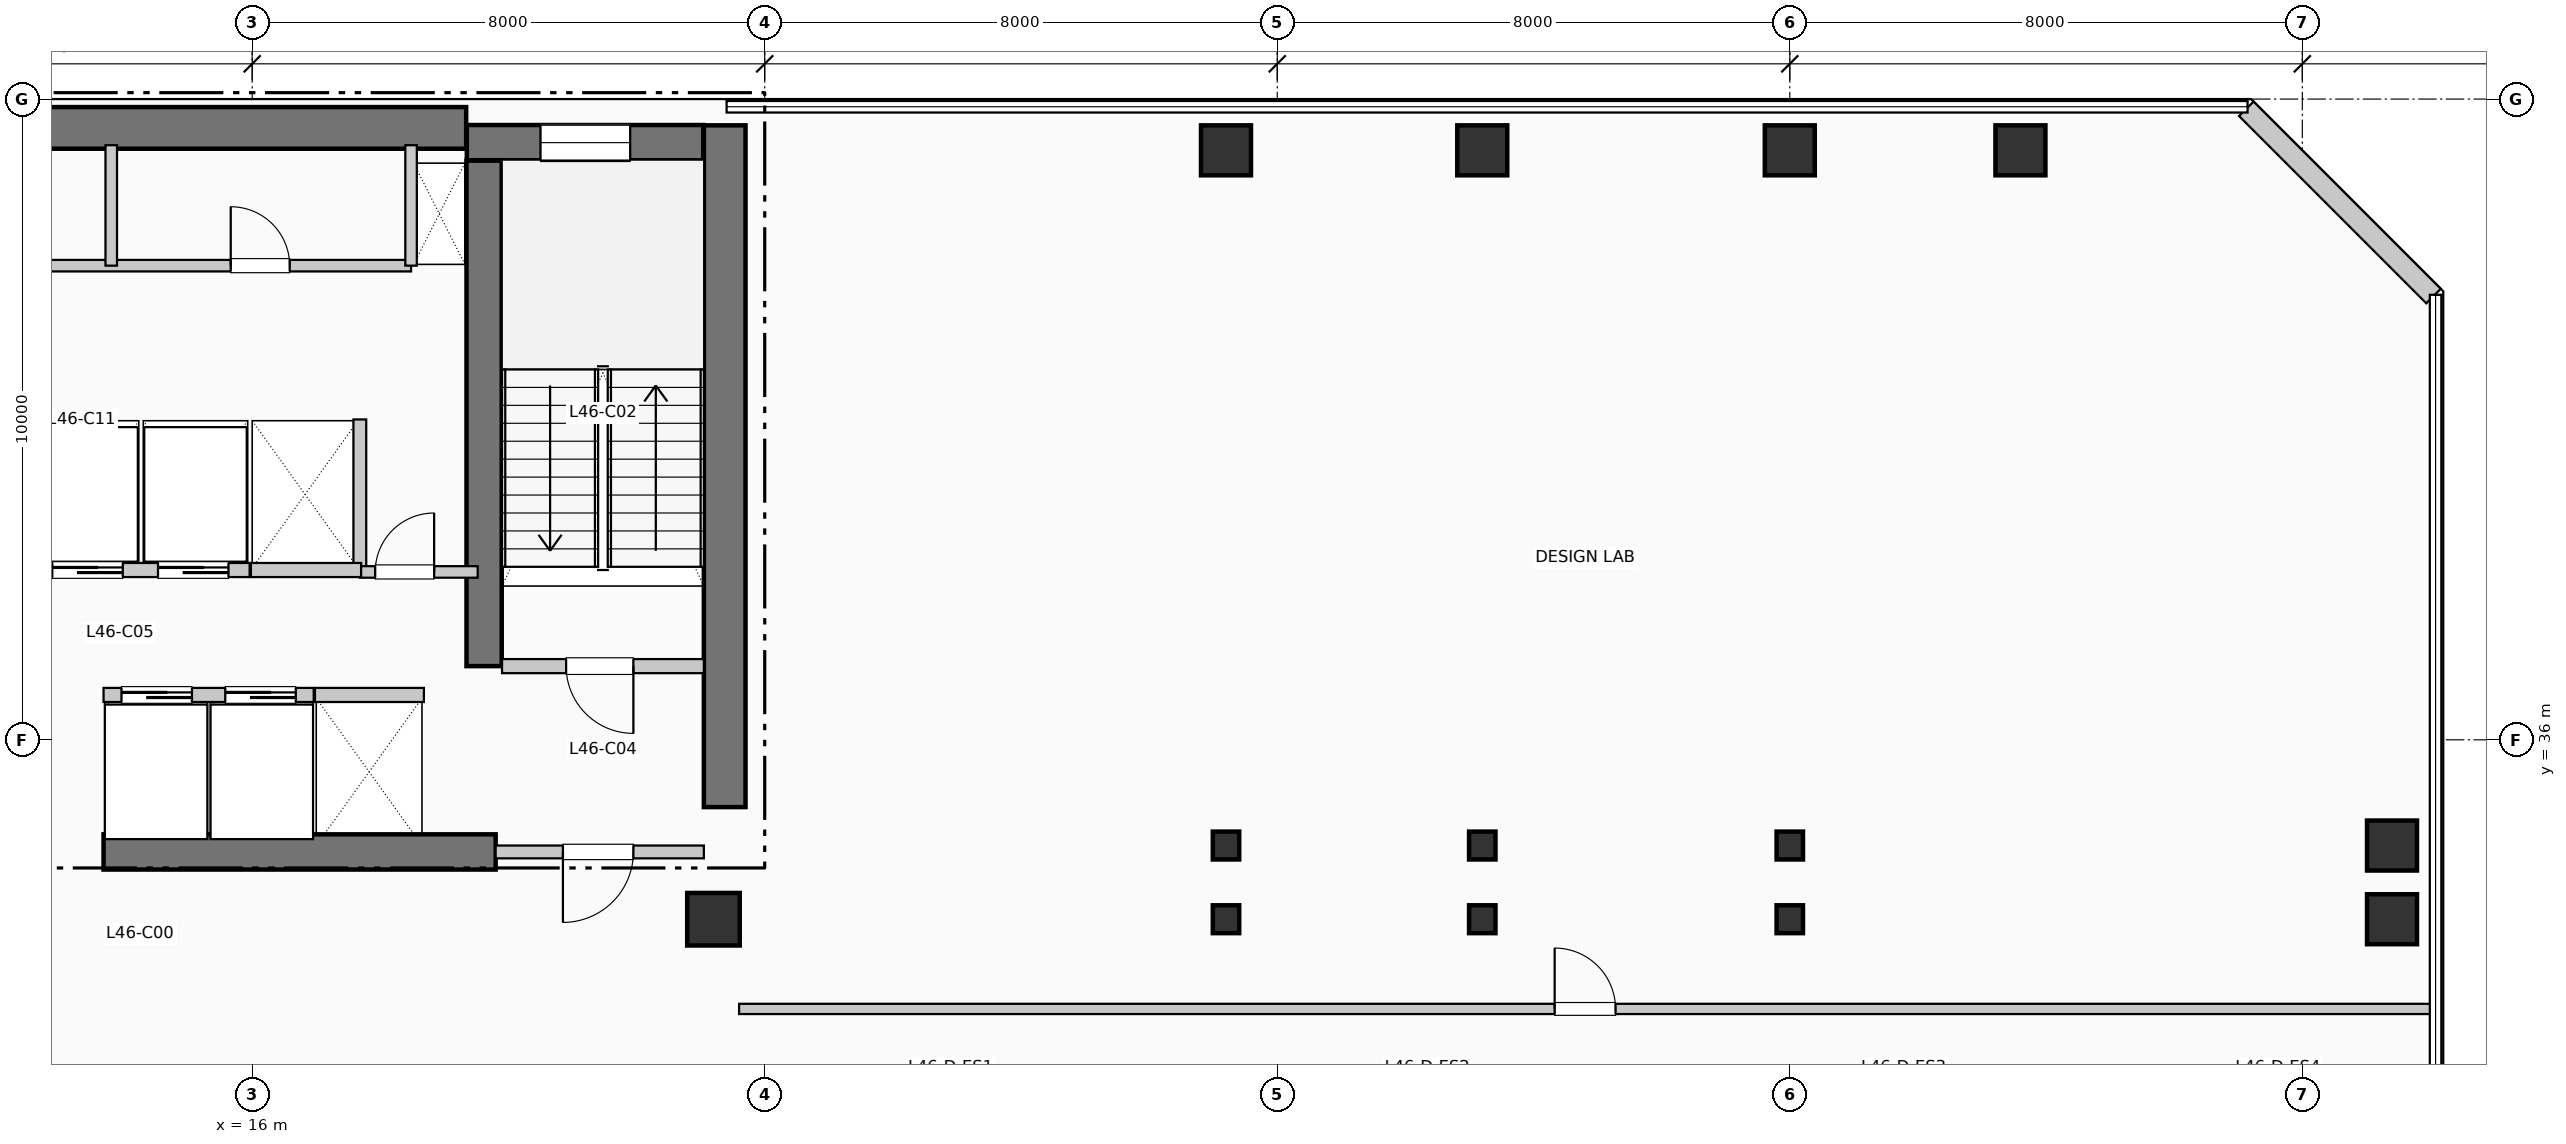
"""IFC4 building model, lengths in metres.
Left out: names, types, materials, properties, quantities, classifications, styles, units other than length and angle.
Written with IfcOpenShell. Run it as: python <this file> out.ifc"""

import sys

from ifc_helpers import new_model, si_unit, direction, frame, frame_2d, origin, origin_2d, place, context, subcontext, project, spatial, rectangle, i_section, extrude, element, fill, save


model = new_model("IFC4")
c1 = context("Model", 3, precision=1e-05, world=origin(), true_north=direction((0.0, 1.0)))
c2 = subcontext(c1, "Body", "Model", "MODEL_VIEW")
j1 = project(units=[si_unit("LENGTHUNIT", "METRE"), si_unit("PLANEANGLEUNIT", "RADIAN")], contexts=[c1])
p1 = place(None, origin())
s1 = spatial("IfcSite", under=j1, at=p1, CompositionType="ELEMENT")
p2 = place(p1, origin())
s2 = spatial("IfcBuilding", under=s1, at=p2, CompositionType="ELEMENT")
p3 = place(p2, frame((0.0, 0.0, 191.4)))
s3 = spatial("IfcBuildingStorey", under=s2, at=p3, CompositionType="ELEMENT", Elevation=191.4)
p4 = place(p3, frame((5.36, 45.55, 0.0), z_axis=(0.0, 0.0, 1.0), x_axis=(1.0, 0.0, 0.0)))
e1 = element("IfcWall", 1, at=p4, inside=s3, PredefinedType="SHEAR", context=c2, shape_type="SweptSolid", body=[
    extrude(rectangle(XDim=13.98, YDim=0.65, at=frame_2d((6.99, 0.0))), origin(), (0.0, 0.0, 1.0), 3.96),
])
p5 = place(p3, frame((23.375, 34.95, 0.0), z_axis=(0.0, 0.0, 1.0), x_axis=(0.0, 1.0, 0.0)))
e2 = element("IfcWall", 2, at=p5, inside=s3, PredefinedType="SHEAR", context=c2, shape_type="SweptSolid", body=[
    extrude(rectangle(XDim=10.64, YDim=0.65, at=frame_2d((5.32, 0.0))), origin(), (0.0, 0.0, 1.0), 3.96),
])
p6 = place(p3, frame((13.68, 34.25, 0.0), z_axis=(0.0, 0.0, 1.0), x_axis=(1.0, 0.0, 0.0)))
e3 = element("IfcWall", 3, at=p6, inside=s3, PredefinedType="SHEAR", context=c2, shape_type="SweptSolid", body=[
    extrude(rectangle(XDim=6.12, YDim=0.55, at=frame_2d((3.06, 0.0))), origin(), (0.0, 0.0, 1.0), 3.96),
])
p7 = place(p3, frame((19.62, 37.15, 0.0), z_axis=(0.0, 0.0, 1.0), x_axis=(0.0, 1.0, 0.0)))
e4 = element("IfcWall", 4, at=p7, inside=s3, PredefinedType="SHEAR", context=c2, shape_type="SweptSolid", body=[
    extrude(rectangle(XDim=7.89, YDim=0.55, at=frame_2d((3.945, 0.0))), origin(), (0.0, 0.0, 1.0), 3.96),
])
p8 = place(p3, frame((19.35, 45.32, 0.0), z_axis=(0.0, 0.0, 1.0), x_axis=(1.0, 0.0, 0.0)))
e5 = element("IfcWall", 5, at=p8, inside=s3, PredefinedType="SHEAR", context=c2, shape_type="SweptSolid", body=[
    extrude(rectangle(XDim=3.69, YDim=0.55, at=frame_2d((1.845, 0.0))), origin(), (0.0, 0.0, 1.0), 3.96),
])
p9 = place(p8, frame((1.15, 0.0, 1.05)))
e6 = element("IfcOpeningElement", 6, at=p9, cuts=e5, PredefinedType="OPENING", context=c2, shape_type="SweptSolid", body=[
    extrude(rectangle(XDim=1.4, YDim=1.8, at=frame_2d((0.7, 0.9))), frame((0.0, 0.285, 0.0), z_axis=(0.0, -1.0, 0.0), x_axis=(1.0, 0.0, 0.0)), (0.0, 0.0, 1.0), 0.57),
])
p10 = place(p3, frame((23.2, 33.2, 0.0), z_axis=(0.0, 0.0, 1.0), x_axis=(1.0, 0.0, 0.0)))
e7 = element("IfcColumn", 7, at=p10, inside=s3, PredefinedType="COLUMN", context=c2, shape_type="SweptSolid", body=[
    extrude(rectangle(XDim=0.82, YDim=0.82, at=origin_2d()), origin(), (0.0, 0.0, 1.0), 3.96),
])
for number, where, z_axis, x_axis in (
    (8, (31.2, 33.2, 0.0), (0.0, 0.0, 1.0), (1.0, 0.0, 0.0)),
    (9, (31.2, 34.35, 0.0), (0.0, 0.0, 1.0), (1.0, 0.0, 0.0)),
):
    element("IfcColumn", number, at=place(p3, frame(where, z_axis=z_axis, x_axis=x_axis)), inside=s3, PredefinedType="COLUMN", context=c2, shape_type="SweptSolid", body=[
        extrude(i_section(OverallWidth=0.412, OverallDepth=0.435, WebThickness=0.027, FlangeThickness=0.043, at=origin_2d()), origin(), (0.0, 0.0, 1.0), 3.96),
    ])
p11 = place(p3, frame((31.2, 45.2, 0.0), z_axis=(0.0, 0.0, 1.0), x_axis=(1.0, 0.0, 0.0)))
e10 = element("IfcColumn", 10, at=p11, inside=s3, PredefinedType="COLUMN", context=c2, shape_type="SweptSolid", body=[
    extrude(rectangle(XDim=0.78, YDim=0.78, at=origin_2d()), origin(), (0.0, 0.0, 1.0), 3.96),
])
for number, where, z_axis, x_axis in (
    (11, (35.2, 33.2, 0.0), (0.0, 0.0, 1.0), (1.0, 0.0, 0.0)),
    (12, (35.2, 34.35, 0.0), (0.0, 0.0, 1.0), (1.0, 0.0, 0.0)),
):
    element("IfcColumn", number, at=place(p3, frame(where, z_axis=z_axis, x_axis=x_axis)), inside=s3, PredefinedType="COLUMN", context=c2, shape_type="SweptSolid", body=[
        extrude(i_section(OverallWidth=0.412, OverallDepth=0.435, WebThickness=0.027, FlangeThickness=0.043, at=origin_2d()), origin(), (0.0, 0.0, 1.0), 3.96),
    ])
p12 = place(p3, frame((35.2, 45.2, 0.0), z_axis=(0.0, 0.0, 1.0), x_axis=(1.0, 0.0, 0.0)))
e13 = element("IfcColumn", 13, at=p12, inside=s3, PredefinedType="COLUMN", context=c2, shape_type="SweptSolid", body=[
    extrude(rectangle(XDim=0.78, YDim=0.78, at=origin_2d()), origin(), (0.0, 0.0, 1.0), 3.96),
])
for number, where, z_axis, x_axis in (
    (14, (40.0, 33.2, 0.0), (0.0, 0.0, 1.0), (1.0, 0.0, 0.0)),
    (15, (40.0, 34.35, 0.0), (0.0, 0.0, 1.0), (1.0, 0.0, 0.0)),
):
    element("IfcColumn", number, at=place(p3, frame(where, z_axis=z_axis, x_axis=x_axis)), inside=s3, PredefinedType="COLUMN", context=c2, shape_type="SweptSolid", body=[
        extrude(i_section(OverallWidth=0.412, OverallDepth=0.435, WebThickness=0.027, FlangeThickness=0.043, at=origin_2d()), origin(), (0.0, 0.0, 1.0), 3.96),
    ])
for number, where, z_axis, x_axis in (
    (16, (40.0, 45.2, 0.0), (0.0, 0.0, 1.0), (1.0, 0.0, 0.0)),
    (17, (43.6, 45.2, 0.0), (0.0, 0.0, 1.0), (1.0, 0.0, 0.0)),
    (18, (49.4, 33.2, 0.0), (0.0, 0.0, 1.0), (1.0, 0.0, 0.0)),
    (19, (49.4, 34.35, 0.0), (0.0, 0.0, 1.0), (1.0, 0.0, 0.0)),
):
    element("IfcColumn", number, at=place(p3, frame(where, z_axis=z_axis, x_axis=x_axis)), inside=s3, PredefinedType="COLUMN", context=c2, shape_type="SweptSolid", body=[
        extrude(rectangle(XDim=0.78, YDim=0.78, at=origin_2d()), origin(), (0.0, 0.0, 1.0), 3.96),
    ])
p13 = place(p3, frame((50.048, 42.926, 0.0), z_axis=(0.0, 0.0, 1.0), x_axis=(-0.707136318428, 0.707077242712, 0.0)))
e20 = element("IfcWall", 20, at=p13, inside=s3, PredefinedType="SOLIDWALL", context=c2, shape_type="SweptSolid", body=[
    extrude(rectangle(XDim=4.133, YDim=0.32, at=frame_2d((2.066, 0.0))), origin(), (0.0, 0.0, 1.0), 3.71),
])
p14 = place(p3, frame((19.9, 37.15, 0.0), z_axis=(0.0, 0.0, 1.0), x_axis=(1.0, 0.0, 0.0)))
e21 = element("IfcWall", 21, at=p14, inside=s3, PredefinedType="PARTITIONING", context=c2, shape_type="SweptSolid", body=[
    extrude(rectangle(XDim=3.15, YDim=0.22, at=frame_2d((1.575, 0.0))), origin(), (0.0, 0.0, 1.0), 3.71),
])
p15 = place(p14, frame((2.05, 0.0, 0.0), z_axis=(0.0, 0.0, 1.0), x_axis=(-1.0, 0.0, 0.0)))
e22 = element("IfcOpeningElement", 22, at=p15, cuts=e21, PredefinedType="OPENING", context=c2, shape_type="SweptSolid", body=[
    extrude(rectangle(XDim=1.05, YDim=2.15, at=frame_2d((0.525, 1.075))), frame((0.0, 0.12, 0.0), z_axis=(0.0, -1.0, 0.0), x_axis=(1.0, 0.0, 0.0)), (0.0, 0.0, 1.0), 0.24),
])
p16 = place(p3, frame((19.8, 34.25, 0.0), z_axis=(0.0, 0.0, 1.0), x_axis=(1.0, 0.0, 0.0)))
e23 = element("IfcWall", 23, at=p16, inside=s3, PredefinedType="PARTITIONING", context=c2, shape_type="SweptSolid", body=[
    extrude(rectangle(XDim=3.25, YDim=0.2, at=frame_2d((1.625, 0.0))), origin(), (0.0, 0.0, 1.0), 3.71),
])
p17 = place(p16, frame((2.15, 0.0, 0.0), z_axis=(0.0, 0.0, 1.0), x_axis=(-1.0, 0.0, 0.0)))
e24 = element("IfcOpeningElement", 24, at=p17, cuts=e23, PredefinedType="OPENING", context=c2, shape_type="SweptSolid", body=[
    extrude(rectangle(XDim=1.1, YDim=2.15, at=frame_2d((0.55, 1.075))), frame((0.0, 0.11, 0.0), z_axis=(0.0, -1.0, 0.0), x_axis=(1.0, 0.0, 0.0)), (0.0, 0.0, 1.0), 0.22),
])
p18 = place(p3, frame((17.68, 38.65, 0.0), z_axis=(0.0, 0.0, 1.0), x_axis=(0.0, 1.0, 0.0)))
e25 = element("IfcWall", 25, at=p18, inside=s3, PredefinedType="PARTITIONING", context=c2, shape_type="SweptSolid", body=[
    extrude(rectangle(XDim=2.35, YDim=0.2, at=frame_2d((1.175, 0.0))), origin(), (0.0, 0.0, 1.0), 3.71),
])
p19 = place(p3, frame((17.68, 38.62, 0.0), z_axis=(0.0, 0.0, 1.0), x_axis=(1.0, 0.0, 0.0)))
e26 = element("IfcWall", 26, at=p19, inside=s3, PredefinedType="PARTITIONING", context=c2, shape_type="SweptSolid", body=[
    extrude(rectangle(XDim=1.84, YDim=0.18, at=frame_2d((0.92, 0.0))), origin(), (0.0, 0.0, 1.0), 3.71),
])
p20 = place(p19, frame((0.24, 0.0, 0.0)))
e27 = element("IfcOpeningElement", 27, at=p20, cuts=e26, PredefinedType="OPENING", context=c2, shape_type="SweptSolid", body=[
    extrude(rectangle(XDim=0.92, YDim=2.1, at=frame_2d((0.46, 1.05))), frame((0.0, 0.1, 0.0), z_axis=(0.0, -1.0, 0.0), x_axis=(1.0, 0.0, 0.0)), (0.0, 0.0, 1.0), 0.2),
])
p21 = place(p3, frame((13.68, 36.7, 0.0), z_axis=(0.0, 0.0, 1.0), x_axis=(1.0, 0.0, 0.0)))
e28 = element("IfcWall", 28, at=p21, inside=s3, PredefinedType="PARTITIONING", context=c2, shape_type="SweptSolid", body=[
    extrude(rectangle(XDim=3.28, YDim=0.22, at=frame_2d((1.64, 0.0))), origin(), (0.0, 0.0, 1.0), 3.71),
])
p22 = place(p21, frame((0.28, 0.0, 0.0)))
e29 = element("IfcOpeningElement", 29, at=p22, cuts=e28, PredefinedType="OPENING", context=c2, shape_type="SweptSolid", body=[
    extrude(rectangle(XDim=1.1, YDim=2.2, at=frame_2d((0.55, 1.1))), frame((0.0, 0.12, 0.0), z_axis=(0.0, -1.0, 0.0), x_axis=(1.0, 0.0, 0.0)), (0.0, 0.0, 1.0), 0.24),
])
p23 = place(p21, frame((1.9, 0.0, 0.0)))
e30 = element("IfcOpeningElement", 30, at=p23, cuts=e28, PredefinedType="OPENING", context=c2, shape_type="SweptSolid", body=[
    extrude(rectangle(XDim=1.1, YDim=2.2, at=frame_2d((0.55, 1.1))), frame((0.0, 0.12, 0.0), z_axis=(0.0, -1.0, 0.0), x_axis=(1.0, 0.0, 0.0)), (0.0, 0.0, 1.0), 0.24),
])
p24 = place(p3, frame((12.58, 38.65, 0.0), z_axis=(0.0, 0.0, 1.0), x_axis=(1.0, 0.0, 0.0)))
e31 = element("IfcWall", 31, at=p24, inside=s3, PredefinedType="PARTITIONING", context=c2, shape_type="SweptSolid", body=[
    extrude(rectangle(XDim=3.38, YDim=0.22, at=frame_2d((1.69, 0.0))), origin(), (0.0, 0.0, 1.0), 3.71),
])
p25 = place(p24, frame((0.3, 0.0, 0.0)))
e32 = element("IfcOpeningElement", 32, at=p25, cuts=e31, PredefinedType="OPENING", context=c2, shape_type="SweptSolid", body=[
    extrude(rectangle(XDim=1.1, YDim=2.2, at=frame_2d((0.55, 1.1))), frame((0.0, 0.12, 0.0), z_axis=(0.0, -1.0, 0.0), x_axis=(1.0, 0.0, 0.0)), (0.0, 0.0, 1.0), 0.24),
])
p26 = place(p24, frame((1.95, 0.0, 0.0)))
e33 = element("IfcOpeningElement", 33, at=p26, cuts=e31, PredefinedType="OPENING", context=c2, shape_type="SweptSolid", body=[
    extrude(rectangle(XDim=1.1, YDim=2.2, at=frame_2d((0.55, 1.1))), frame((0.0, 0.12, 0.0), z_axis=(0.0, -1.0, 0.0), x_axis=(1.0, 0.0, 0.0)), (0.0, 0.0, 1.0), 0.24),
])
p27 = place(p3, frame((16.98, 36.7, 0.0), z_axis=(0.0, 0.0, 1.0), x_axis=(1.0, 0.0, 0.0)))
e34 = element("IfcWall", 34, at=p27, inside=s3, PredefinedType="PARTITIONING", context=c2, shape_type="SweptSolid", body=[
    extrude(rectangle(XDim=1.7, YDim=0.22, at=frame_2d((0.85, 0.0))), origin(), (0.0, 0.0, 1.0), 3.71),
])
p28 = place(p3, frame((15.98, 38.65, 0.0), z_axis=(0.0, 0.0, 1.0), x_axis=(1.0, 0.0, 0.0)))
e35 = element("IfcWall", 35, at=p28, inside=s3, PredefinedType="PARTITIONING", context=c2, shape_type="SweptSolid", body=[
    extrude(rectangle(XDim=1.72, YDim=0.22, at=frame_2d((0.86, 0.0))), origin(), (0.0, 0.0, 1.0), 3.71),
])
p29 = place(p3, frame((9.15, 43.4, 0.0), z_axis=(0.0, 0.0, 1.0), x_axis=(1.0, 0.0, 0.0)))
e36 = element("IfcWall", 36, at=p29, inside=s3, PredefinedType="PLUMBINGWALL", context=c2, shape_type="SweptSolid", body=[
    extrude(rectangle(XDim=9.33, YDim=0.18, at=frame_2d((4.665, 0.0))), origin(), (0.0, 0.0, 1.0), 3.71),
])
p30 = place(p29, frame((1.88, 0.0, 0.0)))
e37 = element("IfcOpeningElement", 37, at=p30, cuts=e36, PredefinedType="OPENING", context=c2, shape_type="SweptSolid", body=[
    extrude(rectangle(XDim=0.92, YDim=2.1, at=frame_2d((0.46, 1.05))), frame((0.0, 0.1, 0.0), z_axis=(0.0, -1.0, 0.0), x_axis=(1.0, 0.0, 0.0)), (0.0, 0.0, 1.0), 0.2),
])
p31 = place(p29, frame((6.515, 0.0, 0.0)))
e38 = element("IfcOpeningElement", 38, at=p31, cuts=e36, PredefinedType="OPENING", context=c2, shape_type="SweptSolid", body=[
    extrude(rectangle(XDim=0.92, YDim=2.1, at=frame_2d((0.46, 1.05))), frame((0.0, 0.1, 0.0), z_axis=(0.0, -1.0, 0.0), x_axis=(1.0, 0.0, 0.0)), (0.0, 0.0, 1.0), 0.2),
])
for number, where, z_axis, x_axis in (
    (39, (18.48, 43.4, 0.0), (0.0, 0.0, 1.0), (0.0, 1.0, 0.0)),
    (40, (13.8, 43.4, 0.0), (0.0, 0.0, 1.0), (0.0, 1.0, 0.0)),
):
    element("IfcWall", number, at=place(p3, frame(where, z_axis=z_axis, x_axis=x_axis)), inside=s3, PredefinedType="PLUMBINGWALL", context=c2, shape_type="SweptSolid", body=[
        extrude(rectangle(XDim=1.88, YDim=0.18, at=frame_2d((0.94, 0.0))), origin(), (0.0, 0.0, 1.0), 3.71),
    ])
p32 = place(p3, frame((23.6, 31.8, 0.0), z_axis=(0.0, 0.0, 1.0), x_axis=(1.0, 0.0, 0.0)))
e41 = element("IfcWall", 41, at=p32, inside=s3, PredefinedType="PARTITIONING", context=c2, shape_type="SweptSolid", body=[
    extrude(rectangle(XDim=26.41, YDim=0.16, at=frame_2d((13.205, 0.0))), origin(), (0.0, 0.0, 1.0), 3.71),
])
p33 = place(p32, frame((12.73, 0.0, 0.0)))
e42 = element("IfcOpeningElement", 42, at=p33, cuts=e41, PredefinedType="OPENING", context=c2, shape_type="SweptSolid", body=[
    extrude(rectangle(XDim=0.95, YDim=2.15, at=frame_2d((0.475, 1.075))), frame((0.0, 0.09, 0.0), z_axis=(0.0, -1.0, 0.0), x_axis=(1.0, 0.0, 0.0)), (0.0, 0.0, 1.0), 0.18),
])
p34 = place(p9, origin())
e43 = element("IfcWindow", 43, at=p34, inside=s3, PartitioningType="SINGLE_PANEL", PredefinedType="WINDOW", context=c2, shape_type="SweptSolid", body=[
    extrude(rectangle(XDim=1.4, YDim=1.8, at=frame_2d((0.7, 0.9))), frame((0.0, 0.03, 0.0), z_axis=(0.0, -1.0, 0.0), x_axis=(1.0, 0.0, 0.0)), (0.0, 0.0, 1.0), 0.06),
])
fill(e6, e43)
p35 = place(p15, origin())
e44 = element("IfcDoor", 44, at=p35, inside=s3, OperationType="SINGLE_SWING_RIGHT", PredefinedType="DOOR", context=c2, shape_type="SweptSolid", body=[
    extrude(rectangle(XDim=1.05, YDim=2.15, at=frame_2d((0.525, 1.075))), frame((0.0, 0.025, 0.0), z_axis=(0.0, -1.0, 0.0), x_axis=(1.0, 0.0, 0.0)), (0.0, 0.0, 1.0), 0.05),
])
fill(e22, e44)
p36 = place(p17, origin())
e45 = element("IfcDoor", 45, at=p36, inside=s3, OperationType="SINGLE_SWING_LEFT", PredefinedType="DOOR", context=c2, shape_type="SweptSolid", body=[
    extrude(rectangle(XDim=1.1, YDim=2.15, at=frame_2d((0.55, 1.075))), frame((0.0, 0.025, 0.0), z_axis=(0.0, -1.0, 0.0), x_axis=(1.0, 0.0, 0.0)), (0.0, 0.0, 1.0), 0.05),
])
fill(e24, e45)
p37 = place(p20, origin())
e46 = element("IfcDoor", 46, at=p37, inside=s3, OperationType="SINGLE_SWING_RIGHT", PredefinedType="DOOR", context=c2, shape_type="SweptSolid", body=[
    extrude(rectangle(XDim=0.92, YDim=2.1, at=frame_2d((0.46, 1.05))), frame((0.0, 0.025, 0.0), z_axis=(0.0, -1.0, 0.0), x_axis=(1.0, 0.0, 0.0)), (0.0, 0.0, 1.0), 0.05),
])
fill(e27, e46)
p38 = place(p22, origin())
e47 = element("IfcDoor", 47, at=p38, inside=s3, OperationType="SLIDING_TO_RIGHT", PredefinedType="DOOR", context=c2, shape_type="SweptSolid", body=[
    extrude(rectangle(XDim=1.1, YDim=2.2, at=frame_2d((0.55, 1.1))), frame((0.0, 0.025, 0.0), z_axis=(0.0, -1.0, 0.0), x_axis=(1.0, 0.0, 0.0)), (0.0, 0.0, 1.0), 0.05),
])
fill(e29, e47)
p39 = place(p23, origin())
e48 = element("IfcDoor", 48, at=p39, inside=s3, OperationType="SLIDING_TO_RIGHT", PredefinedType="DOOR", context=c2, shape_type="SweptSolid", body=[
    extrude(rectangle(XDim=1.1, YDim=2.2, at=frame_2d((0.55, 1.1))), frame((0.0, 0.025, 0.0), z_axis=(0.0, -1.0, 0.0), x_axis=(1.0, 0.0, 0.0)), (0.0, 0.0, 1.0), 0.05),
])
fill(e30, e48)
p40 = place(p25, origin())
e49 = element("IfcDoor", 49, at=p40, inside=s3, OperationType="SLIDING_TO_RIGHT", PredefinedType="DOOR", context=c2, shape_type="SweptSolid", body=[
    extrude(rectangle(XDim=1.1, YDim=2.2, at=frame_2d((0.55, 1.1))), frame((0.0, 0.025, 0.0), z_axis=(0.0, -1.0, 0.0), x_axis=(1.0, 0.0, 0.0)), (0.0, 0.0, 1.0), 0.05),
])
fill(e32, e49)
p41 = place(p26, origin())
e50 = element("IfcDoor", 50, at=p41, inside=s3, OperationType="SLIDING_TO_RIGHT", PredefinedType="DOOR", context=c2, shape_type="SweptSolid", body=[
    extrude(rectangle(XDim=1.1, YDim=2.2, at=frame_2d((0.55, 1.1))), frame((0.0, 0.025, 0.0), z_axis=(0.0, -1.0, 0.0), x_axis=(1.0, 0.0, 0.0)), (0.0, 0.0, 1.0), 0.05),
])
fill(e33, e50)
p42 = place(p31, origin())
e51 = element("IfcDoor", 51, at=p42, inside=s3, OperationType="SINGLE_SWING_LEFT", PredefinedType="DOOR", context=c2, shape_type="SweptSolid", body=[
    extrude(rectangle(XDim=0.92, YDim=2.1, at=frame_2d((0.46, 1.05))), frame((0.0, 0.025, 0.0), z_axis=(0.0, -1.0, 0.0), x_axis=(1.0, 0.0, 0.0)), (0.0, 0.0, 1.0), 0.05),
])
fill(e38, e51)
p43 = place(p33, origin())
e52 = element("IfcDoor", 52, at=p43, inside=s3, OperationType="SINGLE_SWING_LEFT", PredefinedType="DOOR", context=c2, shape_type="SweptSolid", body=[
    extrude(rectangle(XDim=0.95, YDim=2.15, at=frame_2d((0.475, 1.075))), frame((0.0, 0.025, 0.0), z_axis=(0.0, -1.0, 0.0), x_axis=(1.0, 0.0, 0.0)), (0.0, 0.0, 1.0), 0.05),
])
fill(e42, e52)
save(model, sys.argv[1])
